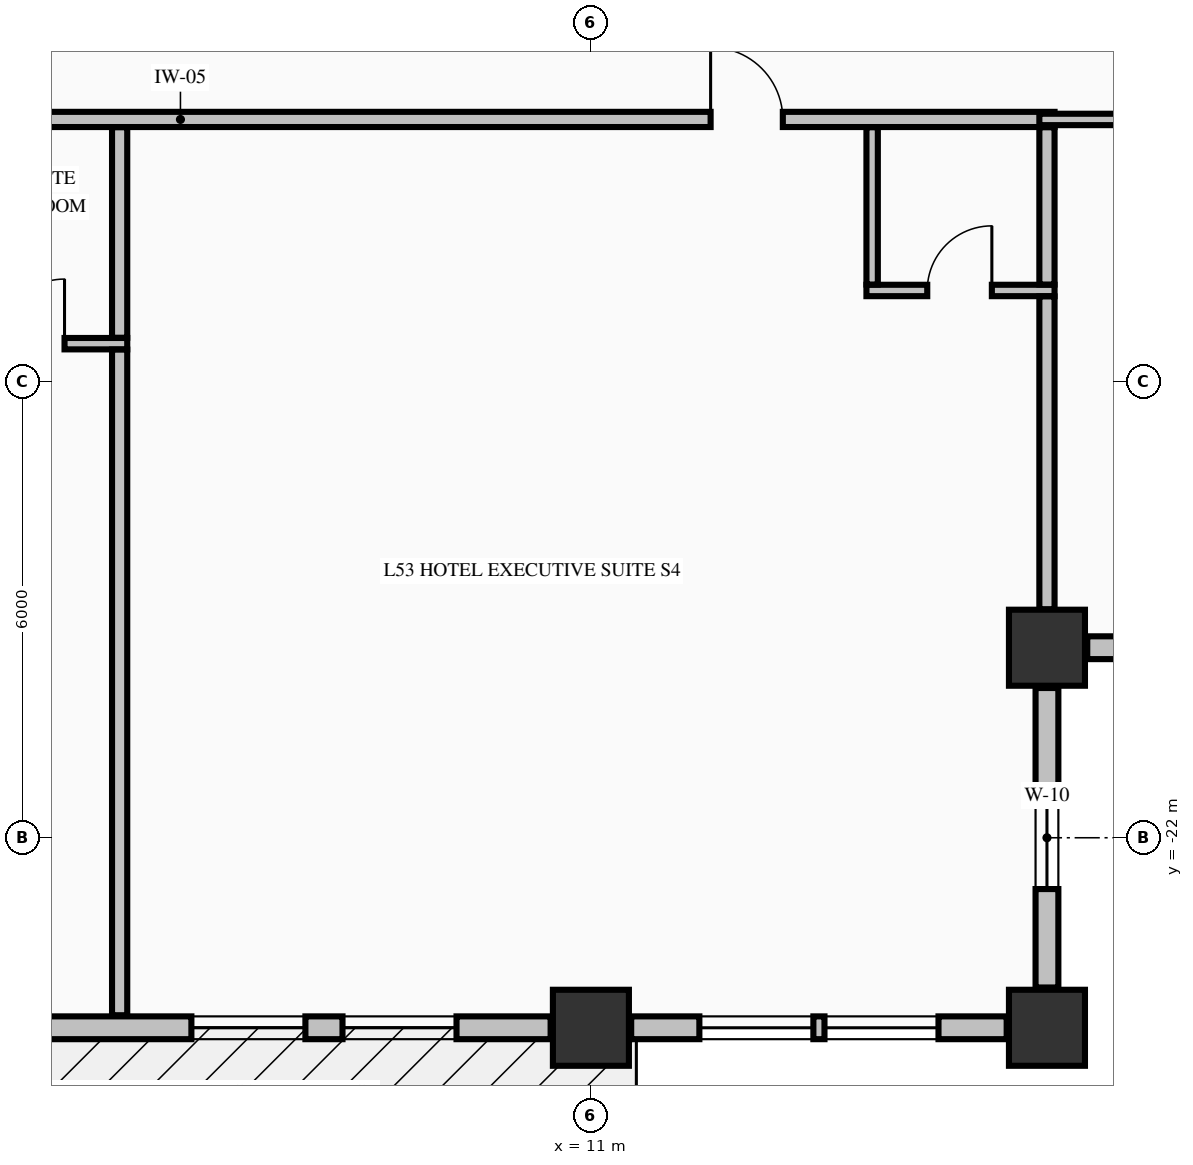
"""IFC4 building model, lengths in metres.
Left out: names, types, materials, properties, quantities, classifications, styles, units other than length and angle.
Written with IfcOpenShell. Run it as: python <this file> out.ifc"""

import sys

from ifc_helpers import new_model, si_unit, direction, frame, frame_2d, origin, origin_2d, place, context, subcontext, project, spatial, rectangle, extrude, element, fill, save


model = new_model("IFC4")
c1 = context("Model", 3, precision=1e-05, world=origin(), true_north=direction((0.0, 1.0)))
c2 = subcontext(c1, "Body", "Model", "MODEL_VIEW")
j1 = project(units=[si_unit("LENGTHUNIT", "METRE"), si_unit("PLANEANGLEUNIT", "RADIAN")], contexts=[c1])
p1 = place(None, origin())
s1 = spatial("IfcSite", under=j1, at=p1, CompositionType="ELEMENT")
p2 = place(p1, origin())
s2 = spatial("IfcBuilding", under=s1, at=p2, CompositionType="ELEMENT")
p3 = place(p2, frame((0.0, 0.0, 205.06)))
s3 = spatial("IfcBuildingStorey", under=s2, at=p3, CompositionType="ELEMENT", Elevation=205.06)
for number, where, z_axis, x_axis in (
    (1, (11.0, -24.5, -0.25), (0.0, 0.0, 1.0), (1.0, 0.0, 0.0)),
    (2, (17.0, -24.5, -0.25), (0.0, 0.0, 1.0), (1.0, 0.0, 0.0)),
    (3, (17.0, -19.5, -0.25), (0.0, 0.0, 1.0), (1.0, 0.0, 0.0)),
):
    element("IfcColumn", number, at=place(p3, frame(where, z_axis=z_axis, x_axis=x_axis)), inside=s3, PredefinedType="COLUMN", context=c2, shape_type="SweptSolid", body=[
        extrude(rectangle(XDim=1.0, YDim=1.0, at=origin_2d()), origin(), (0.0, 0.0, 1.0), 3.4),
    ])
p4 = place(p3, frame((17.0, -23.97, 0.0), z_axis=(0.0, 0.0, 1.0), x_axis=(0.0, 1.0, 0.0)))
e4 = element("IfcWall", 4, at=p4, inside=s3, PredefinedType="STANDARD", context=c2, shape_type="SweptSolid", body=[
    extrude(rectangle(XDim=3.94, YDim=0.3, at=frame_2d((1.97, 0.0))), origin(), (0.0, 0.0, 1.0), 2.542),
])
p5 = place(p4, frame((1.295, 0.0, 0.68)))
e5 = element("IfcOpeningElement", 5, at=p5, cuts=e4, PredefinedType="OPENING", context=c2, shape_type="SweptSolid", body=[
    extrude(rectangle(XDim=1.35, YDim=1.42, at=frame_2d((0.675, 0.71))), frame((0.0, 0.16, 0.0), z_axis=(0.0, -1.0, 0.0), x_axis=(1.0, 0.0, 0.0)), (0.0, 0.0, 1.0), 0.32),
])
p6 = place(p3, frame((17.53, -19.5, 0.0), z_axis=(0.0, 0.0, 1.0), x_axis=(1.0, 0.0, 0.0)))
e6 = element("IfcWall", 6, at=p6, inside=s3, PredefinedType="STANDARD", context=c2, shape_type="SweptSolid", body=[
    extrude(rectangle(XDim=3.94, YDim=0.3, at=frame_2d((1.97, 0.0))), origin(), (0.0, 0.0, 1.0), 2.542),
])
p7 = place(p6, frame((1.295, 0.0, 0.68)))
e7 = element("IfcOpeningElement", 7, at=p7, cuts=e6, PredefinedType="OPENING", context=c2, shape_type="SweptSolid", body=[
    extrude(rectangle(XDim=1.35, YDim=1.42, at=frame_2d((0.675, 0.71))), frame((0.0, 0.16, 0.0), z_axis=(0.0, -1.0, 0.0), x_axis=(1.0, 0.0, 0.0)), (0.0, 0.0, 1.0), 0.32),
])
p8 = place(p3, frame((0.53, -24.5, 0.0), z_axis=(0.0, 0.0, 1.0), x_axis=(1.0, 0.0, 0.0)))
e8 = element("IfcWall", 8, at=p8, inside=s3, PredefinedType="STANDARD", context=c2, shape_type="SweptSolid", body=[
    extrude(rectangle(XDim=9.94, YDim=0.3, at=frame_2d((4.97, 0.0))), origin(), (0.0, 0.0, 1.0), 2.542),
])
p9 = place(p8, frame((1.238, 0.0, 0.72)))
e9 = element("IfcOpeningElement", 9, at=p9, cuts=e8, PredefinedType="OPENING", context=c2, shape_type="SweptSolid", body=[
    extrude(rectangle(XDim=1.5, YDim=1.6, at=frame_2d((0.75, 0.8))), frame((0.0, 0.16, 0.0), z_axis=(0.0, -1.0, 0.0), x_axis=(1.0, 0.0, 0.0)), (0.0, 0.0, 1.0), 0.32),
])
p10 = place(p8, frame((5.214, 0.0, 0.72)))
e10 = element("IfcOpeningElement", 10, at=p10, cuts=e8, PredefinedType="OPENING", context=c2, shape_type="SweptSolid", body=[
    extrude(rectangle(XDim=1.5, YDim=1.6, at=frame_2d((0.75, 0.8))), frame((0.0, 0.16, 0.0), z_axis=(0.0, -1.0, 0.0), x_axis=(1.0, 0.0, 0.0)), (0.0, 0.0, 1.0), 0.32),
])
p11 = place(p8, frame((7.202, 0.0, 0.72)))
e11 = element("IfcOpeningElement", 11, at=p11, cuts=e8, PredefinedType="OPENING", context=c2, shape_type="SweptSolid", body=[
    extrude(rectangle(XDim=1.5, YDim=1.6, at=frame_2d((0.75, 0.8))), frame((0.0, 0.16, 0.0), z_axis=(0.0, -1.0, 0.0), x_axis=(1.0, 0.0, 0.0)), (0.0, 0.0, 1.0), 0.32),
])
p12 = place(p3, frame((11.53, -24.5, 0.0), z_axis=(0.0, 0.0, 1.0), x_axis=(1.0, 0.0, 0.0)))
e12 = element("IfcWall", 12, at=p12, inside=s3, PredefinedType="STANDARD", context=c2, shape_type="SweptSolid", body=[
    extrude(rectangle(XDim=4.94, YDim=0.3, at=frame_2d((2.47, 0.0))), origin(), (0.0, 0.0, 1.0), 2.542),
])
p13 = place(p12, frame((0.897, 0.0, 0.72)))
e13 = element("IfcOpeningElement", 13, at=p13, cuts=e12, PredefinedType="OPENING", context=c2, shape_type="SweptSolid", body=[
    extrude(rectangle(XDim=1.5, YDim=1.6, at=frame_2d((0.75, 0.8))), frame((0.0, 0.16, 0.0), z_axis=(0.0, -1.0, 0.0), x_axis=(1.0, 0.0, 0.0)), (0.0, 0.0, 1.0), 0.32),
])
p14 = place(p12, frame((2.543, 0.0, 0.72)))
e14 = element("IfcOpeningElement", 14, at=p14, cuts=e12, PredefinedType="OPENING", context=c2, shape_type="SweptSolid", body=[
    extrude(rectangle(XDim=1.5, YDim=1.6, at=frame_2d((0.75, 0.8))), frame((0.0, 0.16, 0.0), z_axis=(0.0, -1.0, 0.0), x_axis=(1.0, 0.0, 0.0)), (0.0, 0.0, 1.0), 0.32),
])
p15 = place(p3, frame((2.425, -15.5, 0.0), z_axis=(0.0, 0.0, 1.0), x_axis=(1.0, 0.0, 0.0)))
e15 = element("IfcWall", 15, at=p15, inside=s3, PredefinedType="PARTITIONING", context=c2, shape_type="SweptSolid", body=[
    extrude(rectangle(XDim=2.475, YDim=0.15, at=frame_2d((1.237, 0.0))), origin(), (0.0, 0.0, 1.0), 3.15),
])
p16 = place(p15, frame((0.8, 0.0, 0.0)))
e16 = element("IfcOpeningElement", 16, at=p16, cuts=e15, PredefinedType="OPENING", context=c2, shape_type="SweptSolid", body=[
    extrude(rectangle(XDim=0.85, YDim=2.1, at=frame_2d((0.425, 1.05))), frame((0.0, 0.085, 0.0), z_axis=(0.0, -1.0, 0.0), x_axis=(1.0, 0.0, 0.0)), (0.0, 0.0, 1.0), 0.17),
])
p17 = place(p3, frame((14.625, -14.8, 0.0), z_axis=(0.0, 0.0, 1.0), x_axis=(1.0, 0.0, 0.0)))
e17 = element("IfcWall", 17, at=p17, inside=s3, PredefinedType="PARTITIONING", context=c2, shape_type="SweptSolid", body=[
    extrude(rectangle(XDim=2.475, YDim=0.15, at=frame_2d((1.238, 0.0))), origin(), (0.0, 0.0, 1.0), 3.15),
])
p18 = place(p17, frame((0.8, 0.0, 0.0)))
e18 = element("IfcOpeningElement", 18, at=p18, cuts=e17, PredefinedType="OPENING", context=c2, shape_type="SweptSolid", body=[
    extrude(rectangle(XDim=0.85, YDim=2.1, at=frame_2d((0.425, 1.05))), frame((0.0, 0.085, 0.0), z_axis=(0.0, -1.0, 0.0), x_axis=(1.0, 0.0, 0.0)), (0.0, 0.0, 1.0), 0.17),
])
p19 = place(p3, frame((-22.1, -12.55, 0.0), z_axis=(0.0, 0.0, 1.0), x_axis=(1.0, 0.0, 0.0)))
e19 = element("IfcWall", 19, at=p19, inside=s3, PredefinedType="PARTITIONING", context=c2, shape_type="SweptSolid", body=[
    extrude(rectangle(XDim=39.2, YDim=0.2, at=frame_2d((19.6, 0.0))), origin(), (0.0, 0.0, 1.0), 3.15),
])
p20 = place(p19, frame((3.525, 0.0, 0.0)))
e20 = element("IfcOpeningElement", 20, at=p20, cuts=e19, PredefinedType="OPENING", context=c2, shape_type="SweptSolid", body=[
    extrude(rectangle(XDim=0.95, YDim=2.15, at=frame_2d((0.475, 1.075))), frame((0.0, 0.11, 0.0), z_axis=(0.0, -1.0, 0.0), x_axis=(1.0, 0.0, 0.0)), (0.0, 0.0, 1.0), 0.22),
])
p21 = place(p19, frame((11.475, 0.0, 0.0)))
e21 = element("IfcOpeningElement", 21, at=p21, cuts=e19, PredefinedType="OPENING", context=c2, shape_type="SweptSolid", body=[
    extrude(rectangle(XDim=0.95, YDim=2.15, at=frame_2d((0.475, 1.075))), frame((0.0, 0.11, 0.0), z_axis=(0.0, -1.0, 0.0), x_axis=(1.0, 0.0, 0.0)), (0.0, 0.0, 1.0), 0.22),
])
p22 = place(p19, frame((19.775, 0.0, 0.0)))
e22 = element("IfcOpeningElement", 22, at=p22, cuts=e19, PredefinedType="OPENING", context=c2, shape_type="SweptSolid", body=[
    extrude(rectangle(XDim=0.95, YDim=2.15, at=frame_2d((0.475, 1.075))), frame((0.0, 0.11, 0.0), z_axis=(0.0, -1.0, 0.0), x_axis=(1.0, 0.0, 0.0)), (0.0, 0.0, 1.0), 0.22),
])
p23 = place(p19, frame((34.675, 0.0, 0.0)))
e23 = element("IfcOpeningElement", 23, at=p23, cuts=e19, PredefinedType="OPENING", context=c2, shape_type="SweptSolid", body=[
    extrude(rectangle(XDim=0.95, YDim=2.15, at=frame_2d((0.475, 1.075))), frame((0.0, 0.11, 0.0), z_axis=(0.0, -1.0, 0.0), x_axis=(1.0, 0.0, 0.0)), (0.0, 0.0, 1.0), 0.22),
])
p24 = place(p3, frame((16.9, -12.55, 0.0), z_axis=(0.0, 0.0, 1.0), x_axis=(1.0, 0.0, 0.0)))
e24 = element("IfcWall", 24, at=p24, inside=s3, PredefinedType="PARTITIONING", context=c2, shape_type="SweptSolid", body=[
    extrude(rectangle(XDim=3.175, YDim=0.15, at=frame_2d((1.587, 0.0))), origin(), (0.0, 0.0, 1.0), 3.15),
])
p25 = place(p3, frame((4.8, -24.335, 0.0), z_axis=(0.0, 0.0, 1.0), x_axis=(0.0, 1.0, 0.0)))
e25 = element("IfcWall", 25, at=p25, inside=s3, PredefinedType="PARTITIONING", context=c2, shape_type="SweptSolid", body=[
    extrude(rectangle(XDim=8.757, YDim=0.2, at=frame_2d((4.378, 0.0))), origin(), (0.0, 0.0, 1.0), 3.15),
])
p26 = place(p3, frame((4.8, -15.422, 0.0), z_axis=(0.0, 0.0, 1.0), x_axis=(0.0, 1.0, 0.0)))
e26 = element("IfcWall", 26, at=p26, inside=s3, PredefinedType="PARTITIONING", context=c2, shape_type="SweptSolid", body=[
    extrude(rectangle(XDim=2.769, YDim=0.2, at=frame_2d((1.385, 0.0))), origin(), (0.0, 0.0, 1.0), 3.15),
])
p27 = place(p3, frame((14.7, -14.722, 0.0), z_axis=(0.0, 0.0, 1.0), x_axis=(0.0, 1.0, 0.0)))
e27 = element("IfcWall", 27, at=p27, inside=s3, PredefinedType="PARTITIONING", context=c2, shape_type="SweptSolid", body=[
    extrude(rectangle(XDim=2.069, YDim=0.15, at=frame_2d((1.034, 0.0))), origin(), (0.0, 0.0, 1.0), 3.15),
])
p28 = place(p3, frame((17.0, -18.994, 0.0), z_axis=(0.0, 0.0, 1.0), x_axis=(0.0, 1.0, 0.0)))
e28 = element("IfcWall", 28, at=p28, inside=s3, PredefinedType="PARTITIONING", context=c2, shape_type="SweptSolid", body=[
    extrude(rectangle(XDim=4.116, YDim=0.2, at=frame_2d((2.058, 0.0))), origin(), (0.0, 0.0, 1.0), 3.15),
])
p29 = place(p3, frame((17.0, -14.722, 0.0), z_axis=(0.0, 0.0, 1.0), x_axis=(0.0, 1.0, 0.0)))
e29 = element("IfcWall", 29, at=p29, inside=s3, PredefinedType="PARTITIONING", context=c2, shape_type="SweptSolid", body=[
    extrude(rectangle(XDim=2.069, YDim=0.2, at=frame_2d((1.034, 0.0))), origin(), (0.0, 0.0, 1.0), 3.15),
])
p30 = place(p5, origin())
e30 = element("IfcWindow", 30, at=p30, inside=s3, PartitioningType="SINGLE_PANEL", PredefinedType="WINDOW", context=c2, shape_type="SweptSolid", body=[
    extrude(rectangle(XDim=1.35, YDim=1.42, at=frame_2d((0.675, 0.71))), frame((0.0, 0.03, 0.0), z_axis=(0.0, -1.0, 0.0), x_axis=(1.0, 0.0, 0.0)), (0.0, 0.0, 1.0), 0.06),
])
fill(e5, e30)
p31 = place(p10, origin())
e31 = element("IfcWindow", 31, at=p31, inside=s3, PartitioningType="SINGLE_PANEL", PredefinedType="WINDOW", context=c2, shape_type="SweptSolid", body=[
    extrude(rectangle(XDim=1.5, YDim=1.6, at=frame_2d((0.75, 0.8))), frame((0.0, 0.03, 0.0), z_axis=(0.0, -1.0, 0.0), x_axis=(1.0, 0.0, 0.0)), (0.0, 0.0, 1.0), 0.06),
])
fill(e10, e31)
p32 = place(p11, origin())
e32 = element("IfcWindow", 32, at=p32, inside=s3, PartitioningType="SINGLE_PANEL", PredefinedType="WINDOW", context=c2, shape_type="SweptSolid", body=[
    extrude(rectangle(XDim=1.5, YDim=1.6, at=frame_2d((0.75, 0.8))), frame((0.0, 0.03, 0.0), z_axis=(0.0, -1.0, 0.0), x_axis=(1.0, 0.0, 0.0)), (0.0, 0.0, 1.0), 0.06),
])
fill(e11, e32)
p33 = place(p13, origin())
e33 = element("IfcWindow", 33, at=p33, inside=s3, PartitioningType="SINGLE_PANEL", PredefinedType="WINDOW", context=c2, shape_type="SweptSolid", body=[
    extrude(rectangle(XDim=1.5, YDim=1.6, at=frame_2d((0.75, 0.8))), frame((0.0, 0.03, 0.0), z_axis=(0.0, -1.0, 0.0), x_axis=(1.0, 0.0, 0.0)), (0.0, 0.0, 1.0), 0.06),
])
fill(e13, e33)
p34 = place(p14, origin())
e34 = element("IfcWindow", 34, at=p34, inside=s3, PartitioningType="SINGLE_PANEL", PredefinedType="WINDOW", context=c2, shape_type="SweptSolid", body=[
    extrude(rectangle(XDim=1.5, YDim=1.6, at=frame_2d((0.75, 0.8))), frame((0.0, 0.03, 0.0), z_axis=(0.0, -1.0, 0.0), x_axis=(1.0, 0.0, 0.0)), (0.0, 0.0, 1.0), 0.06),
])
fill(e14, e34)
p35 = place(p16, origin())
e35 = element("IfcDoor", 35, at=p35, inside=s3, OperationType="SINGLE_SWING_RIGHT", PredefinedType="DOOR", context=c2, shape_type="SweptSolid", body=[
    extrude(rectangle(XDim=0.85, YDim=2.1, at=frame_2d((0.425, 1.05))), frame((0.0, 0.025, 0.0), z_axis=(0.0, -1.0, 0.0), x_axis=(1.0, 0.0, 0.0)), (0.0, 0.0, 1.0), 0.05),
])
fill(e16, e35)
p36 = place(p23, origin())
e36 = element("IfcDoor", 36, at=p36, inside=s3, OperationType="SINGLE_SWING_LEFT", PredefinedType="DOOR", context=c2, shape_type="SweptSolid", body=[
    extrude(rectangle(XDim=0.95, YDim=2.15, at=frame_2d((0.475, 1.075))), frame((0.0, 0.025, 0.0), z_axis=(0.0, -1.0, 0.0), x_axis=(1.0, 0.0, 0.0)), (0.0, 0.0, 1.0), 0.05),
])
fill(e23, e36)
p37 = place(p18, origin())
e37 = element("IfcDoor", 37, at=p37, inside=s3, OperationType="SINGLE_SWING_RIGHT", PredefinedType="DOOR", context=c2, shape_type="SweptSolid", body=[
    extrude(rectangle(XDim=0.85, YDim=2.1, at=frame_2d((0.425, 1.05))), frame((0.0, 0.025, 0.0), z_axis=(0.0, -1.0, 0.0), x_axis=(1.0, 0.0, 0.0)), (0.0, 0.0, 1.0), 0.05),
])
fill(e18, e37)
save(model, sys.argv[1])
